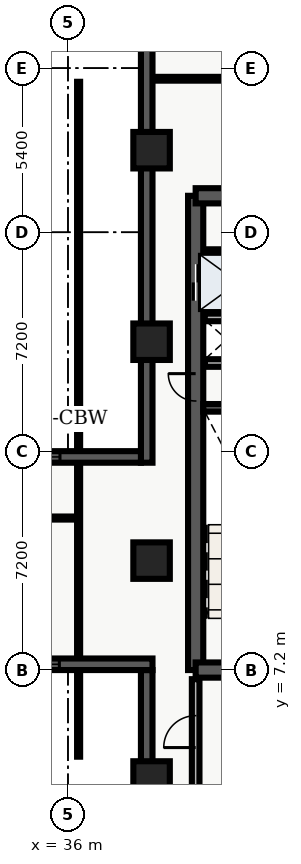
"""IFC4 building model, lengths in metres.
Left out: names, types, materials, properties, quantities, classifications, styles, units other than length and angle.
Written with IfcOpenShell. Run it as: python <this file> out.ifc"""

import sys

from ifc_helpers import new_model, entity, si_unit, converted_unit, direction, frame, origin_with_axes, origin_2d_with_axis, place, context, subcontext, project, spatial, polyline, rectangle, outline, extrude, element, fill, save


model = new_model("IFC4")
c1 = context("Model", 3, precision=1e-05, world=origin_with_axes(), true_north=direction((0.0, 1.0)))
c2 = subcontext(c1, "Body", "Model", "MODEL_VIEW")
j1 = project(units=[si_unit("LENGTHUNIT", "METRE"), converted_unit("PLANEANGLEUNIT", "DEGREE", entity("IfcPlaneAngleMeasure", 0.017), si_unit("PLANEANGLEUNIT", "RADIAN"), dimensions=[0, 0, 0, 0, 0, 0, 0])], contexts=[c1])
p1 = place(None, origin_with_axes())
s1 = spatial("IfcSite", under=j1, at=p1, CompositionType="ELEMENT")
p2 = place(p1, origin_with_axes())
s2 = spatial("IfcBuilding", under=s1, at=p2, CompositionType="ELEMENT")
p3 = place(p2, frame((0.0, 0.0, 104.7), z_axis=(0.0, 0.0, 1.0), x_axis=(1.0, 0.0, 0.0)))
s3 = spatial("IfcBuildingStorey", under=s2, at=p3, CompositionType="ELEMENT", Elevation=104.7)
p4 = place(p3, frame((40.2, 7.2, 0.0), z_axis=(0.0, 0.0, 1.0), x_axis=(0.0, 1.0, 0.0)))
e1 = element("IfcWall", 1, at=p4, inside=s3, PredefinedType="SHEAR", context=c2, shape_type="SweptSolid", body=[
    extrude(outline(polyline([(0.0, -0.25), (15.6, -0.25), (15.6, 0.25), (0.0, 0.25), (0.0, -0.25)])), origin_with_axes(), (0.0, 0.0, 1.0), 3.66),
])
p5 = place(p4, frame((12.75, 0.0, 0.0), z_axis=(0.0, 0.0, 1.0), x_axis=(1.0, 0.0, 0.0)))
e2 = element("IfcOpeningElement", 2, at=p5, cuts=e1, PredefinedType="OPENING", context=c2, shape_type="SweptSolid", body=[
    extrude(rectangle(XDim=1.2, YDim=0.52, at=origin_2d_with_axis()), origin_with_axes(), (0.0, 0.0, 1.0), 2.15),
])
p6 = place(p4, frame((9.3, 0.0, 0.0), z_axis=(0.0, 0.0, 1.0), x_axis=(1.0, 0.0, 0.0)))
e3 = element("IfcOpeningElement", 3, at=p6, cuts=e1, PredefinedType="OPENING", context=c2, shape_type="SweptSolid", body=[
    extrude(rectangle(XDim=0.9, YDim=0.52, at=origin_2d_with_axis()), origin_with_axes(), (0.0, 0.0, 1.0), 2.15),
])
p7 = place(p3, frame((40.2, 7.2, 0.0), z_axis=(0.0, 0.0, 1.0), x_axis=(1.0, 0.0, 0.0)))
e4 = element("IfcWall", 4, at=p7, inside=s3, PredefinedType="SHEAR", context=c2, shape_type="SweptSolid", body=[
    extrude(outline(polyline([(0.0, -0.25), (7.85, -0.25), (7.85, 0.25), (0.0, 0.25), (0.0, -0.25)])), origin_with_axes(), (0.0, 0.0, 1.0), 3.66),
])
p8 = place(p7, frame((2.175, 0.0, 0.0), z_axis=(0.0, 0.0, 1.0), x_axis=(1.0, 0.0, 0.0)))
e5 = element("IfcOpeningElement", 5, at=p8, cuts=e4, PredefinedType="OPENING", context=c2, shape_type="SweptSolid", body=[
    extrude(rectangle(XDim=1.05, YDim=0.52, at=origin_2d_with_axis()), origin_with_axes(), (0.0, 0.0, 1.0), 2.15),
])
p9 = place(p3, frame((40.2, 22.8, 0.0), z_axis=(0.0, 0.0, 1.0), x_axis=(1.0, 0.0, 0.0)))
e6 = element("IfcWall", 6, at=p9, inside=s3, PredefinedType="SHEAR", context=c2, shape_type="SweptSolid", body=[
    extrude(outline(polyline([(0.0, -0.25), (7.85, -0.25), (7.85, 0.25), (0.0, 0.25), (0.0, -0.25)])), origin_with_axes(), (0.0, 0.0, 1.0), 3.66),
])
p10 = place(p9, frame((5.775, 0.0, 0.0), z_axis=(0.0, 0.0, 1.0), x_axis=(1.0, 0.0, 0.0)))
e7 = element("IfcOpeningElement", 7, at=p10, cuts=e6, PredefinedType="OPENING", context=c2, shape_type="SweptSolid", body=[
    extrude(rectangle(XDim=1.05, YDim=0.52, at=origin_2d_with_axis()), origin_with_axes(), (0.0, 0.0, 1.0), 2.15),
])
p11 = place(p9, frame((2.15, 0.0, 0.0), z_axis=(0.0, 0.0, 1.0), x_axis=(1.0, 0.0, 0.0)))
e8 = element("IfcOpeningElement", 8, at=p11, cuts=e6, PredefinedType="OPENING", context=c2, shape_type="SweptSolid", body=[
    extrude(rectangle(XDim=0.9, YDim=0.52, at=origin_2d_with_axis()), origin_with_axes(), (0.0, 0.0, 1.0), 2.15),
])
p12 = place(p3, frame((40.45, 15.825, 0.0), z_axis=(0.0, 0.0, 1.0), x_axis=(1.0, 0.0, 0.0)))
e9 = element("IfcWall", 9, at=p12, inside=s3, PredefinedType="SHEAR", context=c2, shape_type="SweptSolid", body=[
    extrude(outline(polyline([(0.0, -0.125), (3.55, -0.125), (3.55, 0.125), (0.0, 0.125), (0.0, -0.125)])), origin_with_axes(), (0.0, 0.0, 1.0), 3.66),
])
p13 = place(p3, frame((40.5, 17.3, 0.0), z_axis=(0.0, 0.0, 1.0), x_axis=(1.0, 0.0, 0.0)))
e10 = element("IfcWall", 10, at=p13, inside=s3, PredefinedType="SOLIDWALL", context=c2, shape_type="SweptSolid", body=[
    extrude(outline(polyline([(0.0, -0.125), (3.5, -0.125), (3.5, 0.125), (0.0, 0.125), (0.0, -0.125)])), origin_with_axes(), (0.0, 0.0, 1.0), 2.7),
])
p14 = place(p13, frame((2.4, 0.0, 0.0), z_axis=(0.0, 0.0, 1.0), x_axis=(1.0, 0.0, 0.0)))
e11 = element("IfcOpeningElement", 11, at=p14, cuts=e10, PredefinedType="OPENING", context=c2, shape_type="SweptSolid", body=[
    extrude(rectangle(XDim=0.9, YDim=0.27, at=origin_2d_with_axis()), origin_with_axes(), (0.0, 0.0, 1.0), 2.15),
])
p15 = place(p3, frame((40.5, 18.8, 0.0), z_axis=(0.0, 0.0, 1.0), x_axis=(1.0, 0.0, 0.0)))
e12 = element("IfcWall", 12, at=p15, inside=s3, PredefinedType="SOLIDWALL", context=c2, shape_type="SweptSolid", body=[
    extrude(outline(polyline([(0.0, -0.125), (3.5, -0.125), (3.5, 0.125), (0.0, 0.125), (0.0, -0.125)])), origin_with_axes(), (0.0, 0.0, 1.0), 2.7),
])
p16 = place(p3, frame((40.2, 3.1, 0.0), z_axis=(0.0, 0.0, 1.0), x_axis=(0.0, 1.0, 0.0)))
e13 = element("IfcWall", 13, at=p16, inside=s3, PredefinedType="SOLIDWALL", context=c2, shape_type="SweptSolid", body=[
    extrude(outline(polyline([(0.0, -0.125), (3.8, -0.125), (3.8, 0.125), (0.0, 0.125), (0.0, -0.125)])), origin_with_axes(), (0.0, 0.0, 1.0), 2.7),
])
p17 = place(p16, frame((2.075, 0.0, 0.0), z_axis=(0.0, 0.0, 1.0), x_axis=(1.0, 0.0, 0.0)))
e14 = element("IfcOpeningElement", 14, at=p17, cuts=e13, PredefinedType="OPENING", context=c2, shape_type="SweptSolid", body=[
    extrude(rectangle(XDim=1.05, YDim=0.27, at=origin_2d_with_axis()), origin_with_axes(), (0.0, 0.0, 1.0), 2.15),
])
for number, where, z_axis, x_axis in (
    (15, (38.75, 3.6, 0.0), (0.0, 0.0, 1.0), (1.0, 0.0, 0.0)),
    (16, (38.75, 10.8, 0.0), (0.0, 0.0, 1.0), (1.0, 0.0, 0.0)),
    (17, (38.75, 18.0, 0.0), (0.0, 0.0, 1.0), (1.0, 0.0, 0.0)),
    (18, (38.75, 24.3, 0.0), (0.0, 0.0, 1.0), (1.0, 0.0, 0.0)),
):
    element("IfcColumn", number, at=place(p3, frame(where, z_axis=z_axis, x_axis=x_axis)), inside=s3, PredefinedType="COLUMN", context=c2, shape_type="SweptSolid", body=[
        extrude(rectangle(XDim=1.2, YDim=1.2, at=origin_2d_with_axis()), origin_with_axes(), (0.0, 0.0, 1.0), 3.9),
    ])
p18 = place(p3, frame((40.5, 20.96, 0.0), z_axis=(0.0, 0.0, 1.0), x_axis=(1.0, 0.0, 0.0)))
e19 = element("IfcWall", 19, at=p18, inside=s3, PredefinedType="PARTITIONING", context=c2, shape_type="SweptSolid", body=[
    extrude(outline(polyline([(0.0, -0.08), (3.5, -0.08), (3.5, 0.08), (0.0, 0.08), (0.0, -0.08)])), origin_with_axes(), (0.0, 0.0, 1.0), 2.7),
])
p19 = place(p3, frame((21.15, 12.2, 0.0), z_axis=(0.0, 0.0, 1.0), x_axis=(1.0, 0.0, 0.0)))
e20 = element("IfcWall", 20, at=p19, inside=s3, PredefinedType="PARTITIONING", context=c2, shape_type="SweptSolid", body=[
    extrude(outline(polyline([(0.0, -0.05), (15.2, -0.05), (15.2, 0.05), (0.0, 0.05), (0.0, -0.05)])), origin_with_axes(), (0.0, 0.0, 1.0), 2.7),
])
p20 = place(p19, frame((7.7, 0.0, 0.0), z_axis=(0.0, 0.0, 1.0), x_axis=(1.0, 0.0, 0.0)))
e21 = element("IfcOpeningElement", 21, at=p20, cuts=e20, PredefinedType="OPENING", context=c2, shape_type="SweptSolid", body=[
    extrude(rectangle(XDim=1.0, YDim=0.12, at=origin_2d_with_axis()), origin_with_axes(), (0.0, 0.0, 1.0), 2.15),
])
p21 = place(p3, frame((36.35, 4.35, 0.0), z_axis=(0.0, 0.0, 1.0), x_axis=(0.0, 1.0, 0.0)))
e22 = element("IfcWall", 22, at=p21, inside=s3, PredefinedType="PARTITIONING", context=c2, shape_type="SweptSolid", body=[
    extrude(outline(polyline([(0.0, -0.05), (22.2, -0.05), (22.2, 0.05), (0.0, 0.05), (0.0, -0.05)])), origin_with_axes(), (0.0, 0.0, 1.0), 2.7),
])
p22 = place(p3, frame((38.76, 26.65, 0.0), z_axis=(0.0, 0.0, 1.0), x_axis=(1.0, 0.0, 0.0)))
e23 = element("IfcWall", 23, at=p22, inside=s3, PredefinedType="PARTITIONING", context=c2, shape_type="SweptSolid", body=[
    extrude(outline(polyline([(0.0, -0.062), (20.88, -0.062), (20.88, 0.062), (0.0, 0.062), (0.0, -0.062)])), origin_with_axes(), (0.0, 0.0, 1.0), 2.7),
])
p23 = place(p22, frame((4.24, 0.0, 0.0), z_axis=(0.0, 0.0, 1.0), x_axis=(1.0, 0.0, 0.0)))
e24 = element("IfcOpeningElement", 24, at=p23, cuts=e23, PredefinedType="OPENING", context=c2, shape_type="SweptSolid", body=[
    extrude(rectangle(XDim=1.0, YDim=0.145, at=origin_2d_with_axis()), origin_with_axes(), (0.0, 0.0, 1.0), 2.15),
])
p24 = place(p3, frame((38.59, 14.02, 0.0), z_axis=(0.0, 0.0, 1.0), x_axis=(0.0, 1.0, 0.0)))
e25 = element("IfcWall", 25, at=p24, inside=s3, PredefinedType="SOLIDWALL", context=c2, shape_type="SweptSolid", body=[
    extrude(outline(polyline([(0.0, -0.19), (14.78, -0.19), (14.78, 0.19), (0.0, 0.19), (0.0, -0.19)])), origin_with_axes(), (0.0, 0.0, 1.0), 3.66),
])
p25 = place(p3, frame((38.59, 0.38, 0.0), z_axis=(0.0, 0.0, 1.0), x_axis=(0.0, 1.0, 0.0)))
e26 = element("IfcWall", 26, at=p25, inside=s3, PredefinedType="SOLIDWALL", context=c2, shape_type="SweptSolid", body=[
    extrude(outline(polyline([(0.0, -0.19), (6.82, -0.19), (6.82, 0.19), (0.0, 0.19), (0.0, -0.19)])), origin_with_axes(), (0.0, 0.0, 1.0), 3.66),
])
p26 = place(p3, frame((38.78, 7.39, 0.0), z_axis=(0.0, 0.0, 1.0), x_axis=(-1.0, 0.0, 0.0)))
e27 = element("IfcWall", 27, at=p26, inside=s3, PredefinedType="SOLIDWALL", context=c2, shape_type="SweptSolid", body=[
    extrude(outline(polyline([(0.0, -0.19), (17.18, -0.19), (17.18, 0.19), (0.0, 0.19), (0.0, -0.19)])), origin_with_axes(), (0.0, 0.0, 1.0), 3.66),
])
p27 = place(p26, frame((4.113, 0.0, 0.45), z_axis=(0.0, 0.0, 1.0), x_axis=(1.0, 0.0, 0.0)))
e28 = element("IfcOpeningElement", 28, at=p27, cuts=e27, PredefinedType="OPENING", context=c2, shape_type="SweptSolid", body=[
    extrude(rectangle(XDim=2.1, YDim=0.4, at=origin_2d_with_axis()), origin_with_axes(), (0.0, 0.0, 1.0), 2.2),
])
p28 = place(p26, frame((8.59, 0.0, 0.45), z_axis=(0.0, 0.0, 1.0), x_axis=(1.0, 0.0, 0.0)))
e29 = element("IfcOpeningElement", 29, at=p28, cuts=e27, PredefinedType="OPENING", context=c2, shape_type="SweptSolid", body=[
    extrude(rectangle(XDim=2.1, YDim=0.4, at=origin_2d_with_axis()), origin_with_axes(), (0.0, 0.0, 1.0), 2.2),
])
p29 = place(p26, frame((13.917, 0.0, 0.45), z_axis=(0.0, 0.0, 1.0), x_axis=(1.0, 0.0, 0.0)))
e30 = element("IfcOpeningElement", 30, at=p29, cuts=e27, PredefinedType="OPENING", context=c2, shape_type="SweptSolid", body=[
    extrude(rectangle(XDim=2.1, YDim=0.4, at=origin_2d_with_axis()), origin_with_axes(), (0.0, 0.0, 1.0), 2.2),
])
p30 = place(p3, frame((21.22, 14.21, 0.0), z_axis=(0.0, 0.0, 1.0), x_axis=(1.0, 0.0, 0.0)))
e31 = element("IfcWall", 31, at=p30, inside=s3, PredefinedType="SOLIDWALL", context=c2, shape_type="SweptSolid", body=[
    extrude(outline(polyline([(0.0, -0.19), (17.18, -0.19), (17.18, 0.19), (0.0, 0.19), (0.0, -0.19)])), origin_with_axes(), (0.0, 0.0, 1.0), 3.66),
])
p31 = place(p30, frame((3.263, 0.0, 0.45), z_axis=(0.0, 0.0, 1.0), x_axis=(1.0, 0.0, 0.0)))
e32 = element("IfcOpeningElement", 32, at=p31, cuts=e31, PredefinedType="OPENING", context=c2, shape_type="SweptSolid", body=[
    extrude(rectangle(XDim=2.1, YDim=0.4, at=origin_2d_with_axis()), origin_with_axes(), (0.0, 0.0, 1.0), 2.2),
])
p32 = place(p30, frame((8.59, 0.0, 0.45), z_axis=(0.0, 0.0, 1.0), x_axis=(1.0, 0.0, 0.0)))
e33 = element("IfcOpeningElement", 33, at=p32, cuts=e31, PredefinedType="OPENING", context=c2, shape_type="SweptSolid", body=[
    extrude(rectangle(XDim=2.1, YDim=0.4, at=origin_2d_with_axis()), origin_with_axes(), (0.0, 0.0, 1.0), 2.2),
])
p33 = place(p30, frame((13.467, 0.0, 0.45), z_axis=(0.0, 0.0, 1.0), x_axis=(1.0, 0.0, 0.0)))
e34 = element("IfcOpeningElement", 34, at=p33, cuts=e31, PredefinedType="OPENING", context=c2, shape_type="SweptSolid", body=[
    extrude(rectangle(XDim=2.1, YDim=0.4, at=origin_2d_with_axis()), origin_with_axes(), (0.0, 0.0, 1.0), 2.2),
])
p34 = place(p4, frame((12.75, 0.0, 0.0), z_axis=(0.0, 0.0, 1.0), x_axis=(1.0, 0.0, 0.0)))
e35 = element("IfcDoor", 35, at=p34, inside=s3, OperationType="DOUBLE_DOOR_SLIDING", PredefinedType="DOOR", context=c2, shape_type="SweptSolid", body=[
    extrude(rectangle(XDim=1.2, YDim=0.09, at=origin_2d_with_axis()), origin_with_axes(), (0.0, 0.0, 1.0), 2.15),
])
fill(e2, e35)
p35 = place(p4, frame((9.3, 0.0, 0.0), z_axis=(0.0, 0.0, 1.0), x_axis=(1.0, 0.0, 0.0)))
e36 = element("IfcDoor", 36, at=p35, inside=s3, OperationType="SINGLE_SWING_RIGHT", PredefinedType="DOOR", context=c2, shape_type="SweptSolid", body=[
    extrude(rectangle(XDim=0.9, YDim=0.09, at=origin_2d_with_axis()), origin_with_axes(), (0.0, 0.0, 1.0), 2.15),
])
fill(e3, e36)
p36 = place(p16, frame((2.075, 0.0, 0.0), z_axis=(0.0, 0.0, 1.0), x_axis=(1.0, 0.0, 0.0)))
e37 = element("IfcDoor", 37, at=p36, inside=s3, OperationType="SINGLE_SWING_LEFT", PredefinedType="DOOR", context=c2, shape_type="SweptSolid", body=[
    extrude(rectangle(XDim=1.05, YDim=0.09, at=origin_2d_with_axis()), origin_with_axes(), (0.0, 0.0, 1.0), 2.15),
])
fill(e14, e37)
p37 = place(p26, frame((4.113, 0.0, 0.45), z_axis=(0.0, 0.0, 1.0), x_axis=(1.0, 0.0, 0.0)))
e38 = element("IfcWindow", 38, at=p37, inside=s3, PredefinedType="WINDOW", context=c2, shape_type="SweptSolid", body=[
    extrude(rectangle(XDim=2.1, YDim=0.09, at=origin_2d_with_axis()), origin_with_axes(), (0.0, 0.0, 1.0), 2.2),
])
fill(e28, e38)
p38 = place(p30, frame((13.467, 0.0, 0.45), z_axis=(0.0, 0.0, 1.0), x_axis=(1.0, 0.0, 0.0)))
e39 = element("IfcWindow", 39, at=p38, inside=s3, PredefinedType="WINDOW", context=c2, shape_type="SweptSolid", body=[
    extrude(rectangle(XDim=2.1, YDim=0.09, at=origin_2d_with_axis()), origin_with_axes(), (0.0, 0.0, 1.0), 2.2),
])
fill(e34, e39)
save(model, sys.argv[1])
